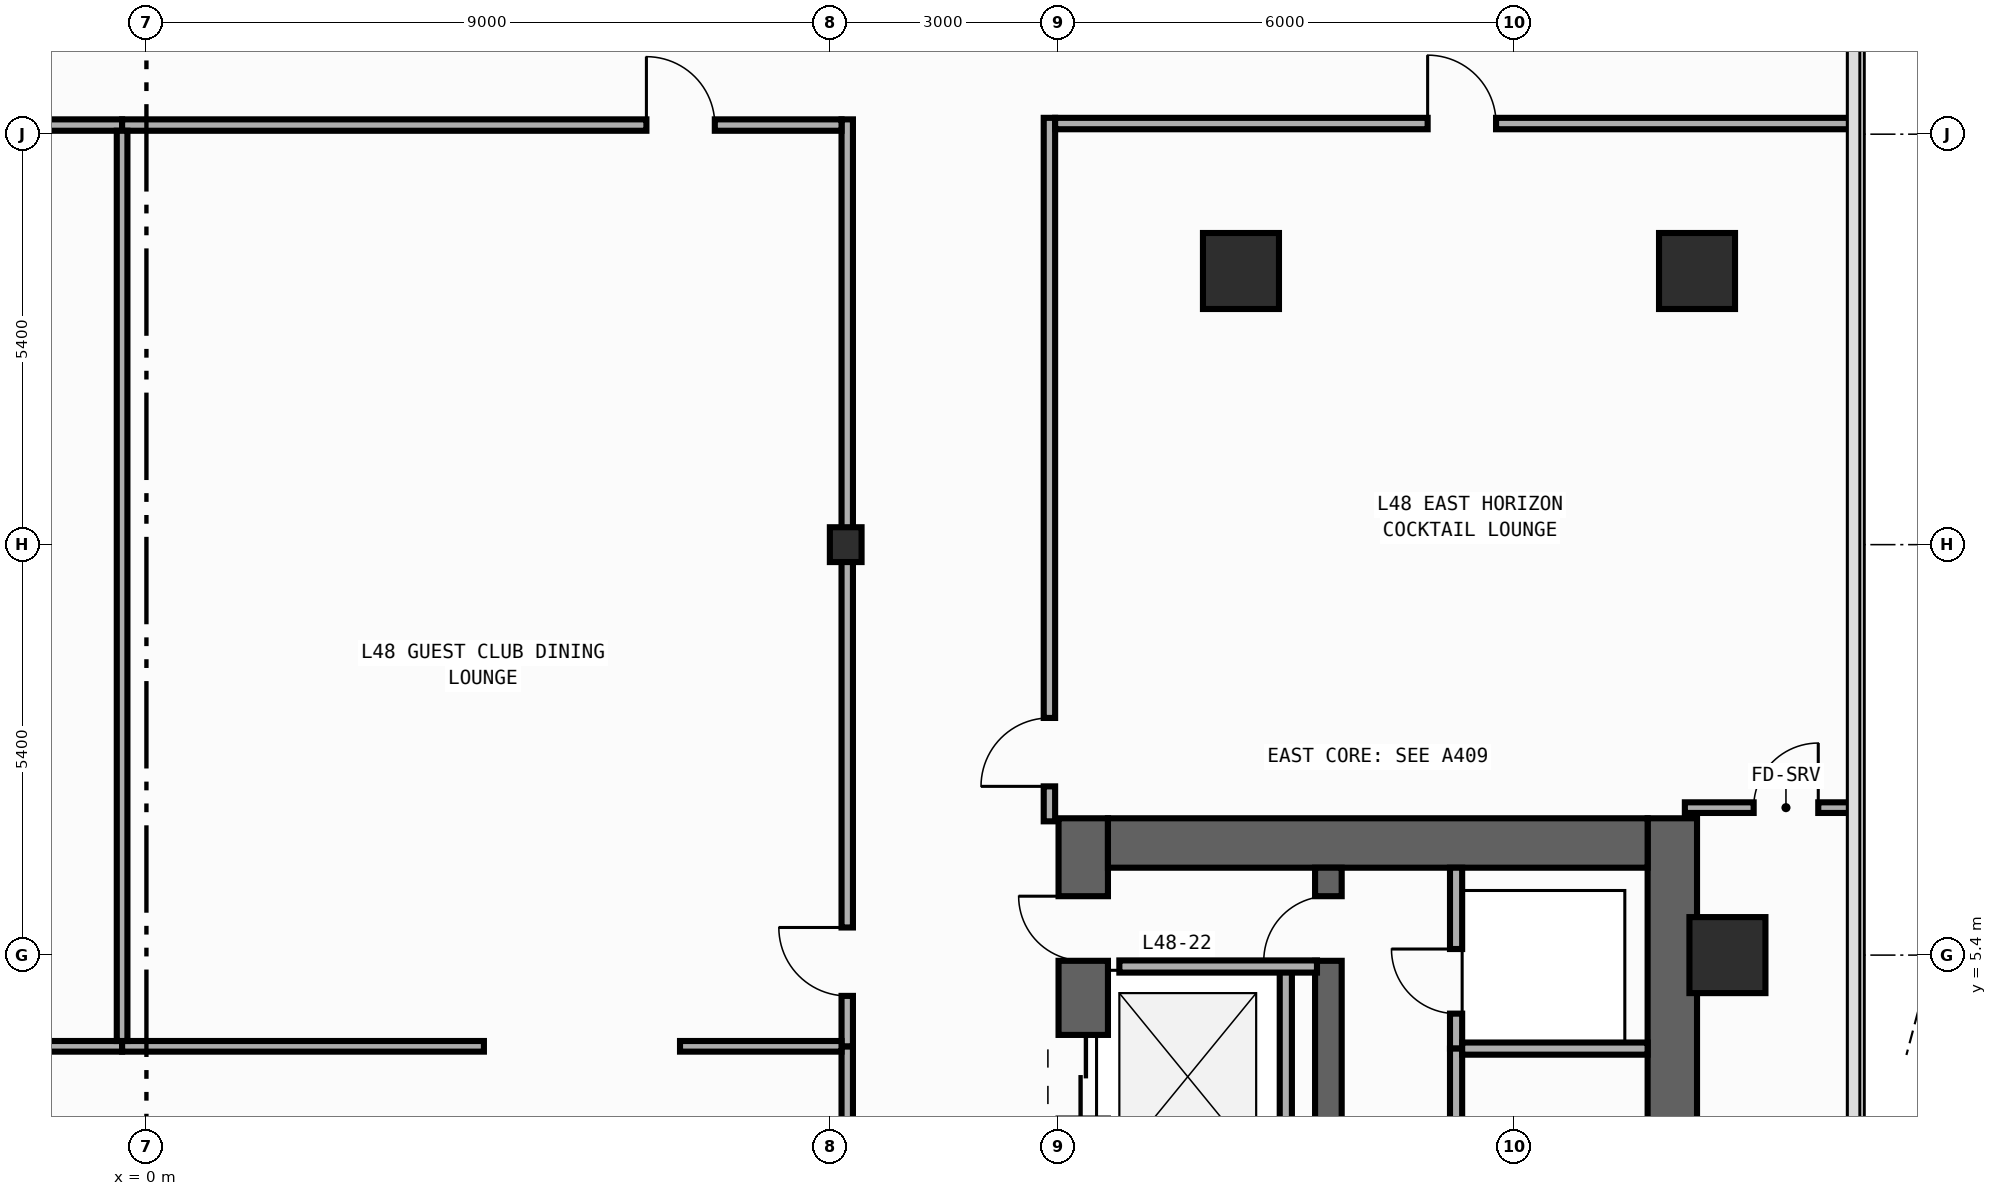
"""IFC4 building model, lengths in metres.
Left out: names, types, materials, properties, quantities, classifications, styles, units other than length and angle.
Written with IfcOpenShell. Run it as: python <this file> out.ifc"""

import sys

from ifc_helpers import new_model, si_unit, direction, frame, frame_2d, origin, origin_2d, place, context, subcontext, project, spatial, rectangle, i_section, extrude, element, fill, save


model = new_model("IFC4")
c1 = context("Model", 3, precision=1e-05, world=origin(), true_north=direction((0.0, 1.0)))
c2 = subcontext(c1, "Body", "Model", "MODEL_VIEW")
j1 = project(units=[si_unit("LENGTHUNIT", "METRE"), si_unit("PLANEANGLEUNIT", "RADIAN")], contexts=[c1])
p1 = place(None, origin())
s1 = spatial("IfcSite", under=j1, at=p1, CompositionType="ELEMENT")
p2 = place(p1, origin())
s2 = spatial("IfcBuilding", under=s1, at=p2, CompositionType="ELEMENT")
p3 = place(p2, frame((0.0, 0.0, 206.8)))
s3 = spatial("IfcBuildingStorey", under=s2, at=p3, CompositionType="ELEMENT", Elevation=206.8)
p4 = place(p3, frame((12.325, -19.8, 0.0), z_axis=(0.0, 0.0, 1.0), x_axis=(0.0, 1.0, 0.0)))
e1 = element("IfcWall", 1, at=p4, inside=s3, PredefinedType="SHEAR", context=c2, shape_type="SweptSolid", body=[
    extrude(rectangle(XDim=27.0, YDim=0.65, at=frame_2d((13.5, 0.0))), origin(), (0.0, 0.0, 1.0), 3.54),
])
p5 = place(p4, frame((23.05, 0.0, 0.0)))
e2 = element("IfcOpeningElement", 2, at=p5, cuts=e1, PredefinedType="OPENING", context=c2, shape_type="SweptSolid", body=[
    extrude(rectangle(XDim=1.1, YDim=2.2, at=frame_2d((0.55, 1.1))), frame((0.0, 0.335, 0.0), z_axis=(0.0, -1.0, 0.0), x_axis=(1.0, 0.0, 0.0)), (0.0, 0.0, 1.0), 0.67),
])
p6 = place(p4, frame((19.85, 0.0, 0.0)))
e3 = element("IfcOpeningElement", 3, at=p6, cuts=e1, PredefinedType="OPENING", context=c2, shape_type="SweptSolid", body=[
    extrude(rectangle(XDim=1.1, YDim=2.2, at=frame_2d((0.55, 1.1))), frame((0.0, 0.335, 0.0), z_axis=(0.0, -1.0, 0.0), x_axis=(1.0, 0.0, 0.0)), (0.0, 0.0, 1.0), 0.67),
])
p7 = place(p4, frame((16.65, 0.0, 0.0)))
e4 = element("IfcOpeningElement", 4, at=p7, cuts=e1, PredefinedType="OPENING", context=c2, shape_type="SweptSolid", body=[
    extrude(rectangle(XDim=1.1, YDim=2.2, at=frame_2d((0.55, 1.1))), frame((0.0, 0.335, 0.0), z_axis=(0.0, -1.0, 0.0), x_axis=(1.0, 0.0, 0.0)), (0.0, 0.0, 1.0), 0.67),
])
p8 = place(p4, frame((7.175, 0.0, 0.0)))
e5 = element("IfcOpeningElement", 5, at=p8, cuts=e1, PredefinedType="OPENING", context=c2, shape_type="SweptSolid", body=[
    extrude(rectangle(XDim=0.85, YDim=2.1, at=frame_2d((0.425, 1.05))), frame((0.0, 0.335, 0.0), z_axis=(0.0, -1.0, 0.0), x_axis=(1.0, 0.0, 0.0)), (0.0, 0.0, 1.0), 0.67),
])
p9 = place(p4, frame((10.375, 0.0, 0.0)))
e6 = element("IfcOpeningElement", 6, at=p9, cuts=e1, PredefinedType="OPENING", context=c2, shape_type="SweptSolid", body=[
    extrude(rectangle(XDim=0.85, YDim=2.1, at=frame_2d((0.425, 1.05))), frame((0.0, 0.335, 0.0), z_axis=(0.0, -1.0, 0.0), x_axis=(1.0, 0.0, 0.0)), (0.0, 0.0, 1.0), 0.67),
])
p10 = place(p4, frame((12.725, 0.0, 0.0)))
e7 = element("IfcOpeningElement", 7, at=p10, cuts=e1, PredefinedType="OPENING", context=c2, shape_type="SweptSolid", body=[
    extrude(rectangle(XDim=1.15, YDim=2.2, at=frame_2d((0.575, 1.1))), frame((0.0, 0.335, 0.0), z_axis=(0.0, -1.0, 0.0), x_axis=(1.0, 0.0, 0.0)), (0.0, 0.0, 1.0), 0.67),
])
p11 = place(p4, frame((25.125, 0.0, 0.0)))
e8 = element("IfcOpeningElement", 8, at=p11, cuts=e1, PredefinedType="OPENING", context=c2, shape_type="SweptSolid", body=[
    extrude(rectangle(XDim=0.85, YDim=2.1, at=frame_2d((0.425, 1.05))), frame((0.0, 0.335, 0.0), z_axis=(0.0, -1.0, 0.0), x_axis=(1.0, 0.0, 0.0)), (0.0, 0.0, 1.0), 0.67),
])
p12 = place(p3, frame((20.075, -19.8, 0.0), z_axis=(0.0, 0.0, 1.0), x_axis=(0.0, 1.0, 0.0)))
e9 = element("IfcWall", 9, at=p12, inside=s3, PredefinedType="SHEAR", context=c2, shape_type="SweptSolid", body=[
    extrude(rectangle(XDim=27.0, YDim=0.65, at=frame_2d((13.5, 0.0))), origin(), (0.0, 0.0, 1.0), 3.54),
])
p13 = place(p3, frame((12.65, 6.875, 0.0), z_axis=(0.0, 0.0, 1.0), x_axis=(1.0, 0.0, 0.0)))
e10 = element("IfcWall", 10, at=p13, inside=s3, PredefinedType="SHEAR", context=c2, shape_type="SweptSolid", body=[
    extrude(rectangle(XDim=7.1, YDim=0.65, at=frame_2d((3.55, 0.0))), origin(), (0.0, 0.0, 1.0), 3.54),
])
p14 = place(p3, frame((15.55, -19.15, 0.0), z_axis=(0.0, 0.0, 1.0), x_axis=(0.0, 1.0, 0.0)))
e11 = element("IfcWall", 11, at=p14, inside=s3, PredefinedType="SHEAR", context=c2, shape_type="SweptSolid", body=[
    extrude(rectangle(XDim=25.7, YDim=0.35, at=frame_2d((12.85, 0.0))), origin(), (0.0, 0.0, 1.0), 3.54),
])
p15 = place(p14, frame((12.075, 0.0, 0.0)))
e12 = element("IfcOpeningElement", 12, at=p15, cuts=e11, PredefinedType="OPENING", context=c2, shape_type="SweptSolid", body=[
    extrude(rectangle(XDim=1.15, YDim=2.2, at=frame_2d((0.575, 1.1))), frame((0.0, 0.185, 0.0), z_axis=(0.0, -1.0, 0.0), x_axis=(1.0, 0.0, 0.0)), (0.0, 0.0, 1.0), 0.37),
])
p16 = place(p14, frame((24.475, 0.0, 0.0)))
e13 = element("IfcOpeningElement", 13, at=p16, cuts=e11, PredefinedType="OPENING", context=c2, shape_type="SweptSolid", body=[
    extrude(rectangle(XDim=0.85, YDim=2.1, at=frame_2d((0.425, 1.05))), frame((0.0, 0.185, 0.0), z_axis=(0.0, -1.0, 0.0), x_axis=(1.0, 0.0, 0.0)), (0.0, 0.0, 1.0), 0.37),
])
p17 = place(p3, frame((9.2, 10.8, 0.0), z_axis=(0.0, 0.0, 1.0), x_axis=(1.0, 0.0, 0.0)))
e14 = element("IfcColumn", 14, at=p17, inside=s3, PredefinedType="COLUMN", context=c2, shape_type="SweptSolid", body=[
    extrude(i_section(OverallWidth=0.417, OverallDepth=0.458, WebThickness=0.03, FlangeThickness=0.05, FilletRadius=0.022, at=origin_2d()), origin(), (0.0, 0.0, 1.0), 3.8),
])
for number, where, z_axis, x_axis in (
    (15, (20.4, 14.4, 0.0), (0.0, 0.0, 1.0), (1.0, 0.0, 0.0)),
    (16, (14.4, 14.4, 0.0), (0.0, 0.0, 1.0), (1.0, 0.0, 0.0)),
    (17, (20.8, 5.4, 0.0), (0.0, 0.0, 1.0), (1.0, 0.0, 0.0)),
):
    element("IfcColumn", number, at=place(p3, frame(where, z_axis=z_axis, x_axis=x_axis)), inside=s3, PredefinedType="COLUMN", context=c2, shape_type="SweptSolid", body=[
        extrude(rectangle(XDim=1.0, YDim=1.0, at=origin_2d()), origin(), (0.0, 0.0, 1.0), 3.8),
    ])
p18 = place(p3, frame((14.99, 2.4, 0.0), z_axis=(0.0, 0.0, 1.0), x_axis=(0.0, 1.0, 0.0)))
e18 = element("IfcWall", 18, at=p18, inside=s3, PredefinedType="STANDARD", context=c2, shape_type="SweptSolid", body=[
    extrude(rectangle(XDim=2.8, YDim=0.16, at=frame_2d((1.4, 0.0))), origin(), (0.0, 0.0, 1.0), 3.54),
])
p19 = place(p3, frame((12.8, 5.25, 0.0), z_axis=(0.0, 0.0, 1.0), x_axis=(1.0, 0.0, 0.0)))
e19 = element("IfcWall", 19, at=p19, inside=s3, PredefinedType="STANDARD", context=c2, shape_type="SweptSolid", body=[
    extrude(rectangle(XDim=2.6, YDim=0.16, at=frame_2d((1.3, 0.0))), origin(), (0.0, 0.0, 1.0), 3.54),
])
p20 = place(p3, frame((17.23, 4.17, 0.0), z_axis=(0.0, 0.0, 1.0), x_axis=(0.0, 1.0, 0.0)))
e20 = element("IfcWall", 20, at=p20, inside=s3, PredefinedType="PARTITIONING", context=c2, shape_type="SweptSolid", body=[
    extrude(rectangle(XDim=2.38, YDim=0.16, at=frame_2d((1.19, 0.0))), origin(), (0.0, 0.0, 1.0), 3.54),
])
p21 = place(p20, frame((0.46, 0.0, 0.0)))
e21 = element("IfcOpeningElement", 21, at=p21, cuts=e20, PredefinedType="OPENING", context=c2, shape_type="SweptSolid", body=[
    extrude(rectangle(XDim=0.85, YDim=2.1, at=frame_2d((0.425, 1.05))), frame((0.0, 0.09, 0.0), z_axis=(0.0, -1.0, 0.0), x_axis=(1.0, 0.0, 0.0)), (0.0, 0.0, 1.0), 0.18),
])
p22 = place(p3, frame((17.23, 1.53, 0.0), z_axis=(0.0, 0.0, 1.0), x_axis=(0.0, 1.0, 0.0)))
e22 = element("IfcWall", 22, at=p22, inside=s3, PredefinedType="PARTITIONING", context=c2, shape_type="SweptSolid", body=[
    extrude(rectangle(XDim=2.64, YDim=0.16, at=frame_2d((1.32, 0.0))), origin(), (0.0, 0.0, 1.0), 3.54),
])
p23 = place(p22, frame((0.677, 0.0, 0.0)))
e23 = element("IfcOpeningElement", 23, at=p23, cuts=e22, PredefinedType="OPENING", context=c2, shape_type="SweptSolid", body=[
    extrude(rectangle(XDim=0.85, YDim=2.1, at=frame_2d((0.425, 1.05))), frame((0.0, 0.09, 0.0), z_axis=(0.0, -1.0, 0.0), x_axis=(1.0, 0.0, 0.0)), (0.0, 0.0, 1.0), 0.18),
])
p24 = place(p3, frame((17.31, 4.17, 0.0), z_axis=(0.0, 0.0, 1.0), x_axis=(1.0, 0.0, 0.0)))
e24 = element("IfcWall", 24, at=p24, inside=s3, PredefinedType="PARTITIONING", context=c2, shape_type="SweptSolid", body=[
    extrude(rectangle(XDim=2.44, YDim=0.16, at=frame_2d((1.22, 0.0))), origin(), (0.0, 0.0, 1.0), 3.54),
])
p25 = place(p3, frame((9.22, -15.195, 0.0), z_axis=(0.0, 0.0, 1.0), x_axis=(0.0, 1.0, 0.0)))
e25 = element("IfcWall", 25, at=p25, inside=s3, PredefinedType="PARTITIONING", context=c2, shape_type="SweptSolid", body=[
    extrude(rectangle(XDim=19.395, YDim=0.15, at=frame_2d((9.698, 0.0))), origin(), (0.0, 0.0, 1.0), 2.952),
])
p26 = place(p25, frame((9.348, 0.0, 0.0)))
e26 = element("IfcOpeningElement", 26, at=p26, cuts=e25, PredefinedType="OPENING", context=c2, shape_type="SweptSolid", body=[
    extrude(rectangle(XDim=0.9, YDim=2.15, at=frame_2d((0.45, 1.075))), frame((0.0, 0.085, 0.0), z_axis=(0.0, -1.0, 0.0), x_axis=(1.0, 0.0, 0.0)), (0.0, 0.0, 1.0), 0.17),
])
p27 = place(p3, frame((9.22, 4.2, 0.0), z_axis=(0.0, 0.0, 1.0), x_axis=(0.0, 1.0, 0.0)))
e27 = element("IfcWall", 27, at=p27, inside=s3, PredefinedType="PARTITIONING", context=c2, shape_type="SweptSolid", body=[
    extrude(rectangle(XDim=12.195, YDim=0.15, at=frame_2d((6.098, 0.0))), origin(), (0.0, 0.0, 1.0), 2.952),
])
p28 = place(p27, frame((0.663, 0.0, 0.0)))
e28 = element("IfcOpeningElement", 28, at=p28, cuts=e27, PredefinedType="OPENING", context=c2, shape_type="SweptSolid", body=[
    extrude(rectangle(XDim=0.9, YDim=2.15, at=frame_2d((0.45, 1.075))), frame((0.0, 0.085, 0.0), z_axis=(0.0, -1.0, 0.0), x_axis=(1.0, 0.0, 0.0)), (0.0, 0.0, 1.0), 0.17),
])
p29 = place(p3, frame((11.88, 7.16, 0.0), z_axis=(0.0, 0.0, 1.0), x_axis=(0.0, 1.0, 0.0)))
e29 = element("IfcWall", 29, at=p29, inside=s3, PredefinedType="PARTITIONING", context=c2, shape_type="SweptSolid", body=[
    extrude(rectangle(XDim=9.255, YDim=0.15, at=frame_2d((4.627, 0.0))), origin(), (0.0, 0.0, 1.0), 3.54),
])
p30 = place(p29, frame((0.46, 0.0, 0.0)))
e30 = element("IfcOpeningElement", 30, at=p30, cuts=e29, PredefinedType="OPENING", context=c2, shape_type="SweptSolid", body=[
    extrude(rectangle(XDim=0.9, YDim=2.15, at=frame_2d((0.45, 1.075))), frame((0.0, 0.085, 0.0), z_axis=(0.0, -1.0, 0.0), x_axis=(1.0, 0.0, 0.0)), (0.0, 0.0, 1.0), 0.17),
])
p31 = place(p3, frame((-9.145, 16.32, 0.0), z_axis=(0.0, 0.0, 1.0), x_axis=(1.0, 0.0, 0.0)))
e31 = element("IfcWall", 31, at=p31, inside=s3, PredefinedType="PARTITIONING", context=c2, shape_type="SweptSolid", body=[
    extrude(rectangle(XDim=8.825, YDim=0.15, at=frame_2d((4.413, 0.0))), origin(), (0.0, 0.0, 1.0), 3.54),
])
p32 = place(p31, frame((1.661, 0.0, 0.0)))
e32 = element("IfcOpeningElement", 32, at=p32, cuts=e31, PredefinedType="OPENING", context=c2, shape_type="SweptSolid", body=[
    extrude(rectangle(XDim=0.9, YDim=2.15, at=frame_2d((0.45, 1.075))), frame((0.0, 0.085, 0.0), z_axis=(0.0, -1.0, 0.0), x_axis=(1.0, 0.0, 0.0)), (0.0, 0.0, 1.0), 0.17),
])
p33 = place(p3, frame((-0.32, 16.32, 0.0), z_axis=(0.0, 0.0, 1.0), x_axis=(1.0, 0.0, 0.0)))
e33 = element("IfcWall", 33, at=p33, inside=s3, PredefinedType="PARTITIONING", context=c2, shape_type="SweptSolid", body=[
    extrude(rectangle(XDim=9.465, YDim=0.15, at=frame_2d((4.732, 0.0))), origin(), (0.0, 0.0, 1.0), 3.54),
])
p34 = place(p33, frame((6.898, 0.0, 0.0)))
e34 = element("IfcOpeningElement", 34, at=p34, cuts=e33, PredefinedType="OPENING", context=c2, shape_type="SweptSolid", body=[
    extrude(rectangle(XDim=0.9, YDim=2.15, at=frame_2d((0.45, 1.075))), frame((0.0, 0.085, 0.0), z_axis=(0.0, -1.0, 0.0), x_axis=(1.0, 0.0, 0.0)), (0.0, 0.0, 1.0), 0.17),
])
p35 = place(p3, frame((11.955, 16.34, 0.0), z_axis=(0.0, 0.0, 1.0), x_axis=(1.0, 0.0, 0.0)))
e35 = element("IfcWall", 35, at=p35, inside=s3, PredefinedType="PARTITIONING", context=c2, shape_type="SweptSolid", body=[
    extrude(rectangle(XDim=10.5, YDim=0.15, at=frame_2d((5.25, 0.0))), origin(), (0.0, 0.0, 1.0), 3.54),
])
p36 = place(p35, frame((4.901, 0.0, 0.0)))
e36 = element("IfcOpeningElement", 36, at=p36, cuts=e35, PredefinedType="OPENING", context=c2, shape_type="SweptSolid", body=[
    extrude(rectangle(XDim=0.9, YDim=2.15, at=frame_2d((0.45, 1.075))), frame((0.0, 0.085, 0.0), z_axis=(0.0, -1.0, 0.0), x_axis=(1.0, 0.0, 0.0)), (0.0, 0.0, 1.0), 0.17),
])
p37 = place(p3, frame((-3.32, 4.2, 0.0), z_axis=(0.0, 0.0, 1.0), x_axis=(1.0, 0.0, 0.0)))
e37 = element("IfcWall", 37, at=p37, inside=s3, PredefinedType="PARTITIONING", context=c2, shape_type="SweptSolid", body=[
    extrude(rectangle(XDim=3.0, YDim=0.14, at=frame_2d((1.5, 0.0))), origin(), (0.0, 0.0, 1.0), 3.54),
])
p38 = place(p3, frame((-0.32, 4.2, 0.0), z_axis=(0.0, 0.0, 1.0), x_axis=(1.0, 0.0, 0.0)))
e38 = element("IfcWall", 38, at=p38, inside=s3, PredefinedType="PARTITIONING", context=c2, shape_type="SweptSolid", body=[
    extrude(rectangle(XDim=4.76, YDim=0.14, at=frame_2d((2.38, 0.0))), origin(), (0.0, 0.0, 1.0), 3.54),
])
p39 = place(p3, frame((7.02, 4.2, 0.0), z_axis=(0.0, 0.0, 1.0), x_axis=(1.0, 0.0, 0.0)))
e39 = element("IfcWall", 39, at=p39, inside=s3, PredefinedType="PARTITIONING", context=c2, shape_type="SweptSolid", body=[
    extrude(rectangle(XDim=2.125, YDim=0.14, at=frame_2d((1.062, 0.0))), origin(), (0.0, 0.0, 1.0), 3.54),
])
p40 = place(p3, frame((-0.32, 4.27, 0.0), z_axis=(0.0, 0.0, 1.0), x_axis=(0.0, 1.0, 0.0)))
e40 = element("IfcWall", 40, at=p40, inside=s3, PredefinedType="PARTITIONING", context=c2, shape_type="SweptSolid", body=[
    extrude(rectangle(XDim=11.975, YDim=0.14, at=frame_2d((5.988, 0.0))), origin(), (0.0, 0.0, 1.0), 3.54),
])
p41 = place(p3, frame((20.24, 7.34, 0.0), z_axis=(0.0, 0.0, 1.0), x_axis=(1.0, 0.0, 0.0)))
e41 = element("IfcWall", 41, at=p41, inside=s3, PredefinedType="PARTITIONING", context=c2, shape_type="SweptSolid", body=[
    extrude(rectangle(XDim=2.215, YDim=0.14, at=frame_2d((1.107, 0.0))), origin(), (0.0, 0.0, 1.0), 3.54),
])
p42 = place(p41, frame((0.905, 0.0, 0.0)))
e42 = element("IfcOpeningElement", 42, at=p42, cuts=e41, PredefinedType="OPENING", context=c2, shape_type="SweptSolid", body=[
    extrude(rectangle(XDim=0.85, YDim=2.1, at=frame_2d((0.425, 1.05))), frame((0.0, 0.08, 0.0), z_axis=(0.0, -1.0, 0.0), x_axis=(1.0, 0.0, 0.0)), (0.0, 0.0, 1.0), 0.16),
])
p43 = place(p5, origin())
e43 = element("IfcDoor", 43, at=p43, inside=s3, OperationType="DOUBLE_DOOR_SLIDING", PredefinedType="DOOR", context=c2, shape_type="SweptSolid", body=[
    extrude(rectangle(XDim=1.1, YDim=2.2, at=frame_2d((0.55, 1.1))), frame((0.0, 0.025, 0.0), z_axis=(0.0, -1.0, 0.0), x_axis=(1.0, 0.0, 0.0)), (0.0, 0.0, 1.0), 0.05),
])
fill(e2, e43)
p44 = place(p11, origin())
e44 = element("IfcDoor", 44, at=p44, inside=s3, OperationType="SINGLE_SWING_RIGHT", PredefinedType="DOOR", context=c2, shape_type="SweptSolid", body=[
    extrude(rectangle(XDim=0.85, YDim=2.1, at=frame_2d((0.425, 1.05))), frame((0.0, 0.025, 0.0), z_axis=(0.0, -1.0, 0.0), x_axis=(1.0, 0.0, 0.0)), (0.0, 0.0, 1.0), 0.05),
])
fill(e8, e44)
p45 = place(p16, origin())
e45 = element("IfcDoor", 45, at=p45, inside=s3, OperationType="SINGLE_SWING_LEFT", PredefinedType="DOOR", context=c2, shape_type="SweptSolid", body=[
    extrude(rectangle(XDim=0.85, YDim=2.1, at=frame_2d((0.425, 1.05))), frame((0.0, 0.025, 0.0), z_axis=(0.0, -1.0, 0.0), x_axis=(1.0, 0.0, 0.0)), (0.0, 0.0, 1.0), 0.05),
])
fill(e13, e45)
p46 = place(p21, origin())
e46 = element("IfcDoor", 46, at=p46, inside=s3, OperationType="SINGLE_SWING_RIGHT", PredefinedType="DOOR", context=c2, shape_type="SweptSolid", body=[
    extrude(rectangle(XDim=0.85, YDim=2.1, at=frame_2d((0.425, 1.05))), frame((0.0, 0.025, 0.0), z_axis=(0.0, -1.0, 0.0), x_axis=(1.0, 0.0, 0.0)), (0.0, 0.0, 1.0), 0.05),
])
fill(e21, e46)
p47 = place(p28, origin())
e47 = element("IfcDoor", 47, at=p47, inside=s3, OperationType="SINGLE_SWING_RIGHT", PredefinedType="DOOR", context=c2, shape_type="SweptSolid", body=[
    extrude(rectangle(XDim=0.9, YDim=2.15, at=frame_2d((0.45, 1.075))), frame((0.0, 0.025, 0.0), z_axis=(0.0, -1.0, 0.0), x_axis=(1.0, 0.0, 0.0)), (0.0, 0.0, 1.0), 0.05),
])
fill(e28, e47)
p48 = place(p30, origin())
e48 = element("IfcDoor", 48, at=p48, inside=s3, OperationType="SINGLE_SWING_LEFT", PredefinedType="DOOR", context=c2, shape_type="SweptSolid", body=[
    extrude(rectangle(XDim=0.9, YDim=2.15, at=frame_2d((0.45, 1.075))), frame((0.0, 0.025, 0.0), z_axis=(0.0, -1.0, 0.0), x_axis=(1.0, 0.0, 0.0)), (0.0, 0.0, 1.0), 0.05),
])
fill(e30, e48)
p49 = place(p34, origin())
e49 = element("IfcDoor", 49, at=p49, inside=s3, OperationType="SINGLE_SWING_LEFT", PredefinedType="DOOR", context=c2, shape_type="SweptSolid", body=[
    extrude(rectangle(XDim=0.9, YDim=2.15, at=frame_2d((0.45, 1.075))), frame((0.0, 0.025, 0.0), z_axis=(0.0, -1.0, 0.0), x_axis=(1.0, 0.0, 0.0)), (0.0, 0.0, 1.0), 0.05),
])
fill(e34, e49)
p50 = place(p36, origin())
e50 = element("IfcDoor", 50, at=p50, inside=s3, OperationType="SINGLE_SWING_LEFT", PredefinedType="DOOR", context=c2, shape_type="SweptSolid", body=[
    extrude(rectangle(XDim=0.9, YDim=2.15, at=frame_2d((0.45, 1.075))), frame((0.0, 0.025, 0.0), z_axis=(0.0, -1.0, 0.0), x_axis=(1.0, 0.0, 0.0)), (0.0, 0.0, 1.0), 0.05),
])
fill(e36, e50)
p51 = place(p42, origin())
e51 = element("IfcDoor", 51, at=p51, inside=s3, OperationType="SINGLE_SWING_RIGHT", PredefinedType="DOOR", context=c2, shape_type="SweptSolid", body=[
    extrude(rectangle(XDim=0.85, YDim=2.1, at=frame_2d((0.425, 1.05))), frame((0.0, 0.025, 0.0), z_axis=(0.0, -1.0, 0.0), x_axis=(1.0, 0.0, 0.0)), (0.0, 0.0, 1.0), 0.05),
])
fill(e42, e51)
save(model, sys.argv[1])
